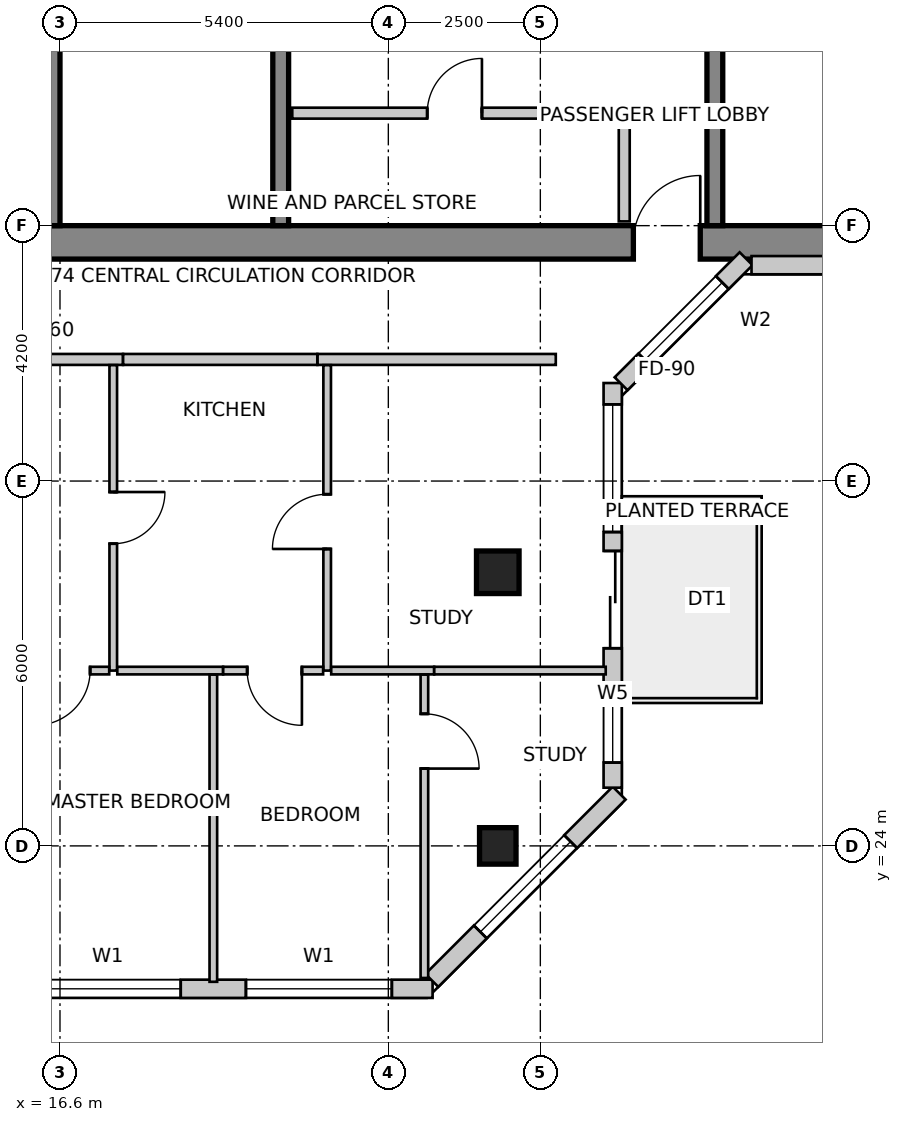
"""IFC4 building model, lengths in metres.
Left out: names, types, materials, properties, quantities, classifications, styles, units other than length and angle.
Written with IfcOpenShell. Run it as: python <this file> out.ifc"""

import sys

from ifc_helpers import new_model, si_unit, direction, frame, frame_2d, origin, origin_2d, place, context, subcontext, project, spatial, rectangle, extrude, source, transform, mapped, element, fill, save


model = new_model("IFC4")
c1 = context("Model", 3, precision=1e-05, world=origin(), true_north=direction((0.0, 1.0)))
c2 = subcontext(c1, "Body", "Model", "MODEL_VIEW")
j1 = project(units=[si_unit("LENGTHUNIT", "METRE"), si_unit("PLANEANGLEUNIT", "RADIAN")], contexts=[c1])
p1 = place(None, origin())
s1 = spatial("IfcSite", under=j1, at=p1, CompositionType="ELEMENT")
p2 = place(p1, origin())
s2 = spatial("IfcBuilding", under=s1, at=p2, CompositionType="ELEMENT")
p3 = place(p2, frame((0.0, 0.0, 288.9)))
s3 = spatial("IfcBuildingStorey", under=s2, at=p3, CompositionType="ELEMENT", Elevation=288.9)
p4 = place(p3, frame((16.05, 33.925, 0.0), z_axis=(0.0, 0.0, 1.0), x_axis=(1.0, 0.0, 0.0)))
e1 = element("IfcWall", 1, at=p4, inside=s3, PredefinedType="SHEAR", context=c2, shape_type="SweptSolid", body=[
    extrude(rectangle(XDim=15.5, YDim=0.55, at=frame_2d((7.75, 0.0))), origin(), (0.0, 0.0, 1.0), 3.6),
])
m1 = source(origin(), c2, "Body", "SweptSolid", [
    extrude(rectangle(XDim=1.1, YDim=2.15, at=frame_2d((0.55, 1.075))), frame((0.0, 0.285, 0.0), z_axis=(0.0, -1.0, 0.0), x_axis=(1.0, 0.0, 0.0)), (0.0, 0.0, 1.0), 0.57),
])
p5 = place(p4, frame((9.98, 0.0, 0.0)))
e2 = element("IfcOpeningElement", 2, at=p5, cuts=e1, PredefinedType="OPENING", context=c2, shape_type="MappedRepresentation", body=[
    mapped(m1, transform((0.0, 0.0, 0.0), scale=1.0)),
])
p6 = place(p3, frame((16.325, 34.2, 0.0), z_axis=(0.0, 0.0, 1.0), x_axis=(0.0, 1.0, 0.0)))
e3 = element("IfcWall", 3, at=p6, inside=s3, PredefinedType="SHEAR", context=c2, shape_type="SweptSolid", body=[
    extrude(rectangle(XDim=11.4, YDim=0.55, at=frame_2d((5.7, 0.0))), origin(), (0.0, 0.0, 1.0), 3.6),
])
p7 = place(p6, frame((7.15, 0.0, 0.0)))
e4 = element("IfcOpeningElement", 4, at=p7, cuts=e3, PredefinedType="OPENING", context=c2, shape_type="MappedRepresentation", body=[
    mapped(m1, transform((0.0, 0.0, 0.0), scale=1.0)),
])
p8 = place(p3, frame((20.23, 34.2, 0.0), z_axis=(0.0, 0.0, 1.0), x_axis=(0.0, 1.0, 0.0)))
e5 = element("IfcWall", 5, at=p8, inside=s3, PredefinedType="SHEAR", context=c2, shape_type="SweptSolid", body=[
    extrude(rectangle(XDim=9.06, YDim=0.26, at=frame_2d((4.53, 0.0))), origin(), (0.0, 0.0, 1.0), 3.6),
])
m2 = source(origin(), c2, "Body", "SweptSolid", [
    extrude(rectangle(XDim=1.1, YDim=2.15, at=frame_2d((0.55, 1.075))), frame((0.0, 0.14, 0.0), z_axis=(0.0, -1.0, 0.0), x_axis=(1.0, 0.0, 0.0)), (0.0, 0.0, 1.0), 0.28),
])
p9 = place(p8, frame((7.45, 0.0, 0.0)))
e6 = element("IfcOpeningElement", 6, at=p9, cuts=e5, PredefinedType="OPENING", context=c2, shape_type="MappedRepresentation", body=[
    mapped(m2, transform((0.0, 0.0, 0.0), scale=1.0)),
])
p10 = place(p3, frame((27.37, 34.2, 0.0), z_axis=(0.0, 0.0, 1.0), x_axis=(0.0, 1.0, 0.0)))
e7 = element("IfcWall", 7, at=p10, inside=s3, PredefinedType="SHEAR", context=c2, shape_type="SweptSolid", body=[
    extrude(rectangle(XDim=9.06, YDim=0.26, at=frame_2d((4.53, 0.0))), origin(), (0.0, 0.0, 1.0), 3.6),
])
p11 = place(p10, frame((7.45, 0.0, 0.0)))
e8 = element("IfcOpeningElement", 8, at=p11, cuts=e7, PredefinedType="OPENING", context=c2, shape_type="MappedRepresentation", body=[
    mapped(m2, transform((0.0, 0.0, 0.0), scale=1.0)),
])
m3 = source(origin(), c2, "Body", "SweptSolid", [
    extrude(rectangle(XDim=0.7, YDim=0.7, at=origin_2d()), origin(), (0.0, 0.0, 1.0), 3.6),
])
p12 = place(p3, frame((23.8, 28.5, 0.0), z_axis=(0.0, 0.0, 1.0), x_axis=(1.0, 0.0, 0.0)))
e9 = element("IfcColumn", 9, at=p12, inside=s3, PredefinedType="COLUMN", context=c2, shape_type="MappedRepresentation", body=[
    mapped(m3, transform((0.0, 0.0, 0.0), scale=1.0)),
])
m4 = source(origin(), c2, "Body", "SweptSolid", [
    extrude(rectangle(XDim=0.6, YDim=0.6, at=origin_2d()), origin(), (0.0, 0.0, 1.0), 3.6),
])
p13 = place(p3, frame((23.8, 24.0, 0.0), z_axis=(0.0, 0.0, 1.0), x_axis=(1.0, 0.0, 0.0)))
e10 = element("IfcColumn", 10, at=p13, inside=s3, PredefinedType="COLUMN", context=c2, shape_type="MappedRepresentation", body=[
    mapped(m4, transform((0.0, 0.0, 0.0), scale=1.0)),
])
p14 = place(p3, frame((12.086, 21.65, 0.0), z_axis=(0.0, 0.0, 1.0), x_axis=(1.0, 0.0, 0.0)))
e11 = element("IfcWall", 11, at=p14, inside=s3, PredefinedType="SOLIDWALL", context=c2, shape_type="SweptSolid", body=[
    extrude(rectangle(XDim=10.642, YDim=0.3, at=frame_2d((5.321, 0.0))), origin(), (0.0, 0.0, 1.0), 3.35),
])
m5 = source(origin(), c2, "Body", "SweptSolid", [
    extrude(rectangle(XDim=2.1, YDim=2.0, at=frame_2d((1.05, 1.0))), frame((0.0, 0.16, 0.0), z_axis=(0.0, -1.0, 0.0), x_axis=(1.0, 0.0, 0.0)), (0.0, 0.0, 1.0), 0.32),
])
p15 = place(p14, frame((1.139, 0.0, 0.85)))
e12 = element("IfcOpeningElement", 12, at=p15, cuts=e11, PredefinedType="OPENING", context=c2, shape_type="MappedRepresentation", body=[
    mapped(m5, transform((0.0, 0.0, 0.0), scale=1.0)),
])
m6 = source(origin(), c2, "Body", "SweptSolid", [
    extrude(rectangle(XDim=2.4, YDim=2.2, at=frame_2d((1.2, 1.1))), frame((0.0, 0.16, 0.0), z_axis=(0.0, -1.0, 0.0), x_axis=(1.0, 0.0, 0.0)), (0.0, 0.0, 1.0), 0.32),
])
p16 = place(p14, frame((4.1, 0.0, 0.85)))
e13 = element("IfcOpeningElement", 13, at=p16, cuts=e11, PredefinedType="OPENING", context=c2, shape_type="MappedRepresentation", body=[
    mapped(m6, transform((0.0, 0.0, 0.0), scale=1.0)),
])
p17 = place(p14, frame((7.572, 0.0, 0.85)))
e14 = element("IfcOpeningElement", 14, at=p17, cuts=e11, PredefinedType="OPENING", context=c2, shape_type="MappedRepresentation", body=[
    mapped(m6, transform((0.0, 0.0, 0.0), scale=1.0)),
])
p18 = place(p3, frame((22.716, 21.788, 0.0), z_axis=(0.0, 0.0, 1.0), x_axis=(0.707134803727, 0.707078757535, 0.0)))
e15 = element("IfcWall", 15, at=p18, inside=s3, PredefinedType="SOLIDWALL", context=c2, shape_type="SweptSolid", body=[
    extrude(rectangle(XDim=4.356, YDim=0.3, at=frame_2d((2.178, 0.0))), origin(), (0.0, 0.0, 1.0), 3.35),
])
p19 = place(p18, frame((1.128, 0.0, 0.85)))
e16 = element("IfcOpeningElement", 16, at=p19, cuts=e15, PredefinedType="OPENING", context=c2, shape_type="MappedRepresentation", body=[
    mapped(m5, transform((0.0, 0.0, 0.0), scale=1.0)),
])
p20 = place(p3, frame((25.69, 24.957, 0.0), z_axis=(0.0, 0.0, 1.0), x_axis=(0.0, 1.0, 0.0)))
e17 = element("IfcWall", 17, at=p20, inside=s3, PredefinedType="SOLIDWALL", context=c2, shape_type="SweptSolid", body=[
    extrude(rectangle(XDim=6.655, YDim=0.3, at=frame_2d((3.327, 0.0))), origin(), (0.0, 0.0, 1.0), 3.35),
])
m7 = source(origin(), c2, "Body", "SweptSolid", [
    extrude(rectangle(XDim=1.6, YDim=2.15, at=frame_2d((0.8, 1.075))), frame((0.0, 0.16, 0.0), z_axis=(0.0, -1.0, 0.0), x_axis=(1.0, 0.0, 0.0)), (0.0, 0.0, 1.0), 0.32),
])
p21 = place(p20, frame((2.293, 0.0, 0.0)))
e18 = element("IfcOpeningElement", 18, at=p21, cuts=e17, PredefinedType="OPENING", context=c2, shape_type="MappedRepresentation", body=[
    mapped(m7, transform((0.0, 0.0, 0.0), scale=1.0)),
])
m8 = source(origin(), c2, "Body", "SweptSolid", [
    extrude(rectangle(XDim=1.2, YDim=1.6, at=frame_2d((0.6, 0.8))), frame((0.0, 0.16, 0.0), z_axis=(0.0, -1.0, 0.0), x_axis=(1.0, 0.0, 0.0)), (0.0, 0.0, 1.0), 0.32),
])
p22 = place(p20, frame((0.413, 0.0, 0.85)))
e19 = element("IfcOpeningElement", 19, at=p22, cuts=e17, PredefinedType="OPENING", context=c2, shape_type="MappedRepresentation", body=[
    mapped(m8, transform((0.0, 0.0, 0.0), scale=1.0)),
])
p23 = place(p20, frame((4.204, 0.0, 0.85)))
e20 = element("IfcOpeningElement", 20, at=p23, cuts=e17, PredefinedType="OPENING", context=c2, shape_type="MappedRepresentation", body=[
    mapped(m5, transform((0.0, 0.0, 0.0), scale=1.0)),
])
p24 = place(p3, frame((25.828, 31.6, 0.0), z_axis=(0.0, 0.0, 1.0), x_axis=(0.707106781187, 0.707106781187, 0.0)))
e21 = element("IfcWall", 21, at=p24, inside=s3, PredefinedType="SOLIDWALL", context=c2, shape_type="SweptSolid", body=[
    extrude(rectangle(XDim=2.907, YDim=0.3, at=frame_2d((1.454, 0.0))), origin(), (0.0, 0.0, 1.0), 3.35),
])
m9 = source(origin(), c2, "Body", "SweptSolid", [
    extrude(rectangle(XDim=1.8, YDim=2.1, at=frame_2d((0.9, 1.05))), frame((0.0, 0.16, 0.0), z_axis=(0.0, -1.0, 0.0), x_axis=(1.0, 0.0, 0.0)), (0.0, 0.0, 1.0), 0.32),
])
p25 = place(p24, frame((0.554, 0.0, 0.85)))
e22 = element("IfcOpeningElement", 22, at=p25, cuts=e21, PredefinedType="OPENING", context=c2, shape_type="MappedRepresentation", body=[
    mapped(m9, transform((0.0, 0.0, 0.0), scale=1.0)),
])
p26 = place(p3, frame((27.973, 33.55, 0.0), z_axis=(0.0, 0.0, 1.0), x_axis=(1.0, 0.0, 0.0)))
e23 = element("IfcWall", 23, at=p26, inside=s3, PredefinedType="SOLIDWALL", context=c2, shape_type="SweptSolid", body=[
    extrude(rectangle(XDim=9.115, YDim=0.3, at=frame_2d((4.558, 0.0))), origin(), (0.0, 0.0, 1.0), 3.35),
])
p27 = place(p26, frame((1.239, 0.0, 0.85)))
e24 = element("IfcOpeningElement", 24, at=p27, cuts=e23, PredefinedType="OPENING", context=c2, shape_type="MappedRepresentation", body=[
    mapped(m6, transform((0.0, 0.0, 0.0), scale=1.0)),
])
p28 = place(p26, frame((5.626, 0.0, 0.85)))
e25 = element("IfcOpeningElement", 25, at=p28, cuts=e23, PredefinedType="OPENING", context=c2, shape_type="MappedRepresentation", body=[
    mapped(m5, transform((0.0, 0.0, 0.0), scale=1.0)),
])
p29 = place(p3, frame((20.42, 36.05, 0.0), z_axis=(0.0, 0.0, 1.0), x_axis=(1.0, 0.0, 0.0)))
e26 = element("IfcWall", 26, at=p29, inside=s3, PredefinedType="PARTITIONING", context=c2, shape_type="SweptSolid", body=[
    extrude(rectangle(XDim=5.46, YDim=0.18, at=frame_2d((2.73, 0.0))), origin(), (0.0, 0.0, 1.0), 3.35),
])
m10 = source(origin(), c2, "Body", "SweptSolid", [
    extrude(rectangle(XDim=0.9, YDim=2.15, at=frame_2d((0.45, 1.075))), frame((0.0, 0.1, 0.0), z_axis=(0.0, -1.0, 0.0), x_axis=(1.0, 0.0, 0.0)), (0.0, 0.0, 1.0), 0.2),
])
p30 = place(p29, frame((2.219, 0.0, 0.0)))
e27 = element("IfcOpeningElement", 27, at=p30, cuts=e26, PredefinedType="OPENING", context=c2, shape_type="MappedRepresentation", body=[
    mapped(m10, transform((0.0, 0.0, 0.0), scale=1.0)),
])
p31 = place(p3, frame((25.88, 35.956, 0.0), z_axis=(0.0, 0.0, 1.0), x_axis=(0.0, -1.0, 0.0)))
e28 = element("IfcWall", 28, at=p31, inside=s3, PredefinedType="PARTITIONING", context=c2, shape_type="SweptSolid", body=[
    extrude(rectangle(XDim=1.686, YDim=0.18, at=frame_2d((0.843, 0.0))), origin(), (0.0, 0.0, 1.0), 2.642),
])
p32 = place(p3, frame((24.754, 32.0, 0.0), z_axis=(0.0, 0.0, 1.0), x_axis=(-1.0, 0.0, 0.0)))
e29 = element("IfcWall", 29, at=p32, inside=s3, PredefinedType="PARTITIONING", context=c2, shape_type="SweptSolid", body=[
    extrude(rectangle(XDim=3.92, YDim=0.18, at=frame_2d((1.96, 0.0))), origin(), (0.0, 0.0, 1.0), 3.034),
])
p33 = place(p3, frame((17.636, 32.0, 0.0), z_axis=(0.0, 0.0, 1.0), x_axis=(-1.0, 0.0, 0.0)))
e30 = element("IfcWall", 30, at=p33, inside=s3, PredefinedType="PARTITIONING", context=c2, shape_type="SweptSolid", body=[
    extrude(rectangle(XDim=5.042, YDim=0.18, at=frame_2d((2.521, 0.0))), origin(), (0.0, 0.0, 1.0), 3.034),
])
p34 = place(p33, frame((2.009, 0.0, 0.0)))
e31 = element("IfcOpeningElement", 31, at=p34, cuts=e30, PredefinedType="OPENING", context=c2, shape_type="MappedRepresentation", body=[
    mapped(m10, transform((0.0, 0.0, 0.0), scale=1.0)),
])
p35 = place(p3, frame((20.832, 32.0, 0.0), z_axis=(0.0, 0.0, 1.0), x_axis=(-1.0, 0.0, 0.0)))
e32 = element("IfcWall", 32, at=p35, inside=s3, PredefinedType="PARTITIONING", context=c2, shape_type="SweptSolid", body=[
    extrude(rectangle(XDim=3.194, YDim=0.18, at=frame_2d((1.597, 0.0))), origin(), (0.0, 0.0, 1.0), 3.35),
])
p36 = place(p3, frame((20.994, 26.883, 0.0), z_axis=(0.0, 0.0, 1.0), x_axis=(0.0, 1.0, 0.0)))
e33 = element("IfcWall", 33, at=p36, inside=s3, PredefinedType="PARTITIONING", context=c2, shape_type="SweptSolid", body=[
    extrude(rectangle(XDim=5.023, YDim=0.125, at=frame_2d((2.511, 0.0))), origin(), (0.0, 0.0, 1.0), 2.979),
])
m11 = source(origin(), c2, "Body", "SweptSolid", [
    extrude(rectangle(XDim=0.9, YDim=2.15, at=frame_2d((0.45, 1.075))), frame((0.0, 0.073, 0.0), z_axis=(0.0, -1.0, 0.0), x_axis=(1.0, 0.0, 0.0)), (0.0, 0.0, 1.0), 0.145),
])
p37 = place(p36, frame((2.0, 0.0, 0.0)))
e34 = element("IfcOpeningElement", 34, at=p37, cuts=e33, PredefinedType="OPENING", context=c2, shape_type="MappedRepresentation", body=[
    mapped(m11, transform((0.0, 0.0, 0.0), scale=1.0)),
])
p38 = place(p3, frame((22.753, 26.883, 0.0), z_axis=(0.0, 0.0, 1.0), x_axis=(-1.0, 0.0, 0.0)))
e35 = element("IfcWall", 35, at=p38, inside=s3, PredefinedType="PARTITIONING", context=c2, shape_type="SweptSolid", body=[
    extrude(rectangle(XDim=1.692, YDim=0.125, at=frame_2d((0.846, 0.0))), origin(), (0.0, 0.0, 1.0), 3.35),
])
p39 = place(p3, frame((25.575, 26.883, 0.0), z_axis=(0.0, 0.0, 1.0), x_axis=(-1.0, 0.0, 0.0)))
e36 = element("IfcWall", 36, at=p39, inside=s3, PredefinedType="PARTITIONING", context=c2, shape_type="SweptSolid", body=[
    extrude(rectangle(XDim=2.82, YDim=0.125, at=frame_2d((1.41, 0.0))), origin(), (0.0, 0.0, 1.0), 2.642),
])
p40 = place(p3, frame((17.476, 31.906, 0.0), z_axis=(0.0, 0.0, 1.0), x_axis=(0.0, -1.0, 0.0)))
e37 = element("IfcWall", 37, at=p40, inside=s3, PredefinedType="PARTITIONING", context=c2, shape_type="SweptSolid", body=[
    extrude(rectangle(XDim=5.023, YDim=0.125, at=frame_2d((2.511, 0.0))), origin(), (0.0, 0.0, 1.0), 2.979),
])
m12 = source(origin(), c2, "Body", "SweptSolid", [
    extrude(rectangle(XDim=0.85, YDim=2.15, at=frame_2d((0.425, 1.075))), frame((0.0, 0.073, 0.0), z_axis=(0.0, -1.0, 0.0), x_axis=(1.0, 0.0, 0.0)), (0.0, 0.0, 1.0), 0.145),
])
p41 = place(p40, frame((2.086, 0.0, 0.0)))
e38 = element("IfcOpeningElement", 38, at=p41, cuts=e37, PredefinedType="OPENING", context=c2, shape_type="MappedRepresentation", body=[
    mapped(m12, transform((0.0, 0.0, 0.0), scale=1.0)),
])
p42 = place(p3, frame((17.409, 26.883, 0.0), z_axis=(0.0, 0.0, 1.0), x_axis=(-1.0, 0.0, 0.0)))
e39 = element("IfcWall", 39, at=p42, inside=s3, PredefinedType="PARTITIONING", context=c2, shape_type="SweptSolid", body=[
    extrude(rectangle(XDim=1.597, YDim=0.125, at=frame_2d((0.799, 0.0))), origin(), (0.0, 0.0, 1.0), 3.034),
])
p43 = place(p42, frame((0.314, 0.0, 0.0)))
e40 = element("IfcOpeningElement", 40, at=p43, cuts=e39, PredefinedType="OPENING", context=c2, shape_type="MappedRepresentation", body=[
    mapped(m11, transform((0.0, 0.0, 0.0), scale=1.0)),
])
p44 = place(p3, frame((19.282, 26.883, 0.0), z_axis=(0.0, 0.0, 1.0), x_axis=(-1.0, 0.0, 0.0)))
e41 = element("IfcWall", 41, at=p44, inside=s3, PredefinedType="PARTITIONING", context=c2, shape_type="SweptSolid", body=[
    extrude(rectangle(XDim=1.74, YDim=0.125, at=frame_2d((0.87, 0.0))), origin(), (0.0, 0.0, 1.0), 3.35),
])
p45 = place(p3, frame((20.927, 26.883, 0.0), z_axis=(0.0, 0.0, 1.0), x_axis=(-1.0, 0.0, 0.0)))
e42 = element("IfcWall", 42, at=p45, inside=s3, PredefinedType="PARTITIONING", context=c2, shape_type="SweptSolid", body=[
    extrude(rectangle(XDim=1.644, YDim=0.125, at=frame_2d((0.822, 0.0))), origin(), (0.0, 0.0, 1.0), 3.35),
])
p46 = place(p45, frame((0.349, 0.0, 0.0)))
e43 = element("IfcOpeningElement", 43, at=p46, cuts=e42, PredefinedType="OPENING", context=c2, shape_type="MappedRepresentation", body=[
    mapped(m11, transform((0.0, 0.0, 0.0), scale=1.0)),
])
p47 = place(p3, frame((19.122, 26.816, 0.0), z_axis=(0.0, 0.0, 1.0), x_axis=(0.0, -1.0, 0.0)))
e44 = element("IfcWall", 44, at=p47, inside=s3, PredefinedType="PARTITIONING", context=c2, shape_type="SweptSolid", body=[
    extrude(rectangle(XDim=5.052, YDim=0.125, at=frame_2d((2.526, 0.0))), origin(), (0.0, 0.0, 1.0), 3.034),
])
p48 = place(p3, frame((22.593, 26.816, 0.0), z_axis=(0.0, 0.0, 1.0), x_axis=(0.0, -1.0, 0.0)))
e45 = element("IfcWall", 45, at=p48, inside=s3, PredefinedType="PARTITIONING", context=c2, shape_type="SweptSolid", body=[
    extrude(rectangle(XDim=4.989, YDim=0.125, at=frame_2d((2.494, 0.0))), origin(), (0.0, 0.0, 1.0), 3.034),
])
p49 = place(p48, frame((0.645, 0.0, 0.0)))
e46 = element("IfcOpeningElement", 46, at=p49, cuts=e45, PredefinedType="OPENING", context=c2, shape_type="MappedRepresentation", body=[
    mapped(m11, transform((0.0, 0.0, 0.0), scale=1.0)),
])
m13 = source(origin(), c2, "Body", "SweptSolid", [
    extrude(rectangle(XDim=2.4, YDim=2.2, at=frame_2d((1.2, 1.1))), frame((0.0, -0.015, 0.0), z_axis=(0.0, -1.0, 0.0), x_axis=(1.0, 0.0, 0.0)), (0.0, 0.0, 1.0), 0.06),
])
p50 = place(p16, origin())
e47 = element("IfcWindow", 47, at=p50, inside=s3, PartitioningType="SINGLE_PANEL", PredefinedType="WINDOW", context=c2, shape_type="MappedRepresentation", body=[
    mapped(m13, transform((0.0, 0.0, 0.0), scale=1.0)),
])
fill(e13, e47)
p51 = place(p17, origin())
e48 = element("IfcWindow", 48, at=p51, inside=s3, PartitioningType="SINGLE_PANEL", PredefinedType="WINDOW", context=c2, shape_type="MappedRepresentation", body=[
    mapped(m13, transform((0.0, 0.0, 0.0), scale=1.0)),
])
fill(e14, e48)
m14 = source(origin(), c2, "Body", "SweptSolid", [
    extrude(rectangle(XDim=2.1, YDim=2.0, at=frame_2d((1.05, 1.0))), frame((0.0, -0.015, 0.0), z_axis=(0.0, -1.0, 0.0), x_axis=(1.0, 0.0, 0.0)), (0.0, 0.0, 1.0), 0.06),
])
p52 = place(p19, origin())
e49 = element("IfcWindow", 49, at=p52, inside=s3, PartitioningType="SINGLE_PANEL", PredefinedType="WINDOW", context=c2, shape_type="MappedRepresentation", body=[
    mapped(m14, transform((0.0, 0.0, 0.0), scale=1.0)),
])
fill(e16, e49)
m15 = source(origin(), c2, "Body", "SweptSolid", [
    extrude(rectangle(XDim=1.6, YDim=2.15, at=frame_2d((0.8, 1.075))), frame((0.0, 0.025, 0.0), z_axis=(0.0, -1.0, 0.0), x_axis=(1.0, 0.0, 0.0)), (0.0, 0.0, 1.0), 0.05),
])
p53 = place(p21, origin())
e50 = element("IfcDoor", 50, at=p53, inside=s3, OperationType="DOUBLE_DOOR_SLIDING", PredefinedType="DOOR", context=c2, shape_type="MappedRepresentation", body=[
    mapped(m15, transform((0.0, 0.0, 0.0), scale=1.0)),
])
fill(e18, e50)
m16 = source(origin(), c2, "Body", "SweptSolid", [
    extrude(rectangle(XDim=1.2, YDim=1.6, at=frame_2d((0.6, 0.8))), frame((0.0, -0.015, 0.0), z_axis=(0.0, -1.0, 0.0), x_axis=(1.0, 0.0, 0.0)), (0.0, 0.0, 1.0), 0.06),
])
p54 = place(p22, origin())
e51 = element("IfcWindow", 51, at=p54, inside=s3, PartitioningType="SINGLE_PANEL", PredefinedType="WINDOW", context=c2, shape_type="MappedRepresentation", body=[
    mapped(m16, transform((0.0, 0.0, 0.0), scale=1.0)),
])
fill(e19, e51)
p55 = place(p23, origin())
e52 = element("IfcWindow", 52, at=p55, inside=s3, PartitioningType="SINGLE_PANEL", PredefinedType="WINDOW", context=c2, shape_type="MappedRepresentation", body=[
    mapped(m14, transform((0.0, 0.0, 0.0), scale=1.0)),
])
fill(e20, e52)
m17 = source(origin(), c2, "Body", "SweptSolid", [
    extrude(rectangle(XDim=1.8, YDim=2.1, at=frame_2d((0.9, 1.05))), frame((0.0, -0.015, 0.0), z_axis=(0.0, -1.0, 0.0), x_axis=(1.0, 0.0, 0.0)), (0.0, 0.0, 1.0), 0.06),
])
p56 = place(p25, origin())
e53 = element("IfcWindow", 53, at=p56, inside=s3, PartitioningType="SINGLE_PANEL", PredefinedType="WINDOW", context=c2, shape_type="MappedRepresentation", body=[
    mapped(m17, transform((0.0, 0.0, 0.0), scale=1.0)),
])
fill(e22, e53)
m18 = source(origin(), c2, "Body", "SweptSolid", [
    extrude(rectangle(XDim=1.1, YDim=2.15, at=frame_2d((0.55, 1.075))), frame((0.0, 0.025, 0.0), z_axis=(0.0, -1.0, 0.0), x_axis=(1.0, 0.0, 0.0)), (0.0, 0.0, 1.0), 0.05),
])
p57 = place(p5, origin())
e54 = element("IfcDoor", 54, at=p57, inside=s3, OperationType="SINGLE_SWING_RIGHT", PredefinedType="DOOR", context=c2, shape_type="MappedRepresentation", body=[
    mapped(m18, transform((0.0, 0.0, 0.0), scale=1.0)),
])
fill(e2, e54)
m19 = source(origin(), c2, "Body", "SweptSolid", [
    extrude(rectangle(XDim=0.9, YDim=2.15, at=frame_2d((0.45, 1.075))), frame((0.0, 0.025, 0.0), z_axis=(0.0, -1.0, 0.0), x_axis=(1.0, 0.0, 0.0)), (0.0, 0.0, 1.0), 0.05),
])
p58 = place(p30, origin())
e55 = element("IfcDoor", 55, at=p58, inside=s3, OperationType="SINGLE_SWING_RIGHT", PredefinedType="DOOR", context=c2, shape_type="MappedRepresentation", body=[
    mapped(m19, transform((0.0, 0.0, 0.0), scale=1.0)),
])
fill(e27, e55)
m20 = source(origin(), c2, "Body", "SweptSolid", [
    extrude(rectangle(XDim=0.9, YDim=2.15, at=frame_2d((0.45, 1.075))), frame((0.0, 0.025, 0.0), z_axis=(0.0, -1.0, 0.0), x_axis=(1.0, 0.0, 0.0)), (0.0, 0.0, 1.0), 0.05),
])
p59 = place(p37, origin())
e56 = element("IfcDoor", 56, at=p59, inside=s3, OperationType="SINGLE_SWING_LEFT", PredefinedType="DOOR", context=c2, shape_type="MappedRepresentation", body=[
    mapped(m20, transform((0.0, 0.0, 0.0), scale=1.0)),
])
fill(e34, e56)
m21 = source(origin(), c2, "Body", "SweptSolid", [
    extrude(rectangle(XDim=0.85, YDim=2.15, at=frame_2d((0.425, 1.075))), frame((0.0, 0.025, 0.0), z_axis=(0.0, -1.0, 0.0), x_axis=(1.0, 0.0, 0.0)), (0.0, 0.0, 1.0), 0.05),
])
p60 = place(p41, origin())
e57 = element("IfcDoor", 57, at=p60, inside=s3, OperationType="SINGLE_SWING_LEFT", PredefinedType="DOOR", context=c2, shape_type="MappedRepresentation", body=[
    mapped(m21, transform((0.0, 0.0, 0.0), scale=1.0)),
])
fill(e38, e57)
p61 = place(p43, origin())
e58 = element("IfcDoor", 58, at=p61, inside=s3, OperationType="SINGLE_SWING_RIGHT", PredefinedType="DOOR", context=c2, shape_type="MappedRepresentation", body=[
    mapped(m20, transform((0.0, 0.0, 0.0), scale=1.0)),
])
fill(e40, e58)
p62 = place(p46, origin())
e59 = element("IfcDoor", 59, at=p62, inside=s3, OperationType="SINGLE_SWING_LEFT", PredefinedType="DOOR", context=c2, shape_type="MappedRepresentation", body=[
    mapped(m20, transform((0.0, 0.0, 0.0), scale=1.0)),
])
fill(e43, e59)
p63 = place(p49, origin())
e60 = element("IfcDoor", 60, at=p63, inside=s3, OperationType="SINGLE_SWING_RIGHT", PredefinedType="DOOR", context=c2, shape_type="MappedRepresentation", body=[
    mapped(m20, transform((0.0, 0.0, 0.0), scale=1.0)),
])
fill(e46, e60)
save(model, sys.argv[1])
